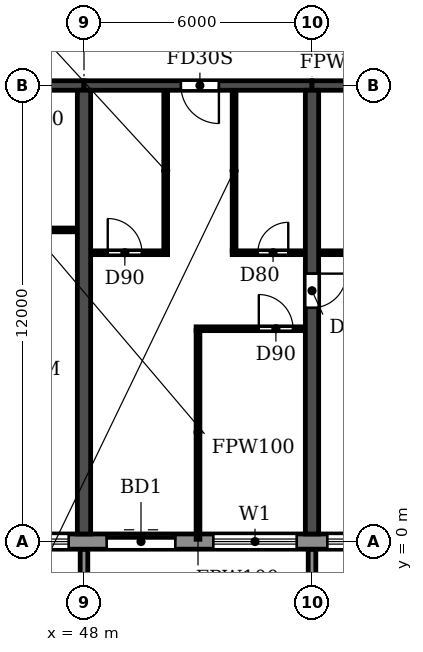
"""IFC4 building model, lengths in metres.
Left out: names, types, materials, properties, quantities, classifications, styles, units other than length and angle.
Written with IfcOpenShell. Run it as: python <this file> out.ifc"""

import sys

from ifc_helpers import new_model, si_unit, direction, frame, frame_2d, origin, place, context, subcontext, project, spatial, polyline, rectangle, outline, extrude, source, transform, mapped, element, fill, save


model = new_model("IFC4")
c1 = context("Model", 3, precision=1e-05, world=origin(), true_north=direction((0.0, 1.0)))
c2 = subcontext(c1, "Body", "Model", "MODEL_VIEW")
j1 = project(units=[si_unit("LENGTHUNIT", "METRE"), si_unit("PLANEANGLEUNIT", "RADIAN")], contexts=[c1])
p1 = place(None, origin())
s1 = spatial("IfcSite", under=j1, at=p1, CompositionType="ELEMENT")
p2 = place(p1, origin())
s2 = spatial("IfcBuilding", under=s1, at=p2, CompositionType="ELEMENT")
p3 = place(p2, frame((0.0, 0.0, 72.9)))
s3 = spatial("IfcBuildingStorey", under=s2, at=p3, CompositionType="ELEMENT", Elevation=72.9)
p4 = place(p3, frame((48.0, 0.2, 0.0), z_axis=(0.0, 0.0, 1.0), x_axis=(0.0, 1.0, 0.0)))
e1 = element("IfcWall", 1, at=p4, inside=s3, PredefinedType="SHEAR", context=c2, shape_type="SweptSolid", body=[
    extrude(rectangle(XDim=11.675, YDim=0.35, at=frame_2d((5.837, 0.0))), origin(), (0.0, 0.0, 1.0), 3.06),
])
p5 = place(p3, frame((54.0, 0.2, 0.0), z_axis=(0.0, 0.0, 1.0), x_axis=(0.0, 1.0, 0.0)))
e2 = element("IfcWall", 2, at=p5, inside=s3, PredefinedType="SHEAR", context=c2, shape_type="SweptSolid", body=[
    extrude(rectangle(XDim=11.675, YDim=0.35, at=frame_2d((5.837, 0.0))), origin(), (0.0, 0.0, 1.0), 3.06),
])
p6 = place(p5, frame((5.95, 0.0, 0.0)))
e3 = element("IfcOpeningElement", 3, at=p6, cuts=e2, PredefinedType="OPENING", context=c2, shape_type="SweptSolid", body=[
    extrude(rectangle(XDim=0.9, YDim=2.1, at=frame_2d((0.45, 1.05))), frame((0.0, 0.185, 0.0), z_axis=(0.0, -1.0, 0.0), x_axis=(1.0, 0.0, 0.0)), (0.0, 0.0, 1.0), 0.37),
])
p7 = place(p3, frame((42.0, 12.0, 0.0), z_axis=(0.0, 0.0, 1.0), x_axis=(1.0, 0.0, 0.0)))
e4 = element("IfcWall", 4, at=p7, inside=s3, PredefinedType="SHEAR", context=c2, shape_type="SweptSolid", body=[
    extrude(rectangle(XDim=6.0, YDim=0.25, at=frame_2d((3.0, 0.0))), origin(), (0.0, 0.0, 1.0), 2.46),
])
p8 = place(p7, frame((2.55, 0.0, 0.0)))
e5 = element("IfcOpeningElement", 5, at=p8, cuts=e4, PredefinedType="OPENING", context=c2, shape_type="SweptSolid", body=[
    extrude(rectangle(XDim=1.0, YDim=2.1, at=frame_2d((0.5, 1.05))), frame((0.0, 0.135, 0.0), z_axis=(0.0, -1.0, 0.0), x_axis=(1.0, 0.0, 0.0)), (0.0, 0.0, 1.0), 0.27),
])
p9 = place(p3, frame((48.0, 12.0, 0.0), z_axis=(0.0, 0.0, 1.0), x_axis=(1.0, 0.0, 0.0)))
e6 = element("IfcWall", 6, at=p9, inside=s3, PredefinedType="SHEAR", context=c2, shape_type="SweptSolid", body=[
    extrude(rectangle(XDim=6.0, YDim=0.25, at=frame_2d((3.0, 0.0))), origin(), (0.0, 0.0, 1.0), 2.46),
])
p10 = place(p9, frame((2.55, 0.0, 0.0)))
e7 = element("IfcOpeningElement", 7, at=p10, cuts=e6, PredefinedType="OPENING", context=c2, shape_type="SweptSolid", body=[
    extrude(rectangle(XDim=1.0, YDim=2.1, at=frame_2d((0.5, 1.05))), frame((0.0, 0.135, 0.0), z_axis=(0.0, -1.0, 0.0), x_axis=(1.0, 0.0, 0.0)), (0.0, 0.0, 1.0), 0.27),
])
p11 = place(p3, frame((54.0, 12.0, 0.0), z_axis=(0.0, 0.0, 1.0), x_axis=(1.0, 0.0, 0.0)))
e8 = element("IfcWall", 8, at=p11, inside=s3, PredefinedType="SHEAR", context=c2, shape_type="SweptSolid", body=[
    extrude(rectangle(XDim=6.0, YDim=0.25, at=frame_2d((3.0, 0.0))), origin(), (0.0, 0.0, 1.0), 2.46),
])
p12 = place(p3, frame((10.683, 0.0, 0.0), z_axis=(0.0, 0.0, 1.0), x_axis=(1.0, 0.0, 0.0)))
e9 = element("IfcWall", 9, at=p12, inside=s3, PredefinedType="STANDARD", context=c2, shape_type="SweptSolid", body=[
    extrude(rectangle(XDim=80.634, YDim=0.4, at=frame_2d((40.317, 0.0))), origin(), (0.0, 0.0, 1.0), 3.06),
])
p13 = place(p12, frame((1.717, 0.0, 0.9)))
e10 = element("IfcOpeningElement", 10, at=p13, cuts=e9, PredefinedType="OPENING", context=c2, shape_type="SweptSolid", body=[
    extrude(rectangle(XDim=2.2, YDim=1.5, at=frame_2d((1.1, 0.75))), frame((0.0, 0.21, 0.0), z_axis=(0.0, -1.0, 0.0), x_axis=(1.0, 0.0, 0.0)), (0.0, 0.0, 1.0), 0.42),
])
p14 = place(p12, frame((4.917, 0.0, 0.0)))
e11 = element("IfcOpeningElement", 11, at=p14, cuts=e9, PredefinedType="OPENING", context=c2, shape_type="SweptSolid", body=[
    extrude(rectangle(XDim=1.8, YDim=2.4, at=frame_2d((0.9, 1.2))), frame((0.0, 0.21, 0.0), z_axis=(0.0, -1.0, 0.0), x_axis=(1.0, 0.0, 0.0)), (0.0, 0.0, 1.0), 0.42),
])
p15 = place(p12, frame((7.717, 0.0, 0.9)))
e12 = element("IfcOpeningElement", 12, at=p15, cuts=e9, PredefinedType="OPENING", context=c2, shape_type="SweptSolid", body=[
    extrude(rectangle(XDim=2.2, YDim=1.5, at=frame_2d((1.1, 0.75))), frame((0.0, 0.21, 0.0), z_axis=(0.0, -1.0, 0.0), x_axis=(1.0, 0.0, 0.0)), (0.0, 0.0, 1.0), 0.42),
])
p16 = place(p12, frame((10.717, 0.0, 0.9)))
e13 = element("IfcOpeningElement", 13, at=p16, cuts=e9, PredefinedType="OPENING", context=c2, shape_type="SweptSolid", body=[
    extrude(rectangle(XDim=2.2, YDim=1.5, at=frame_2d((1.1, 0.75))), frame((0.0, 0.21, 0.0), z_axis=(0.0, -1.0, 0.0), x_axis=(1.0, 0.0, 0.0)), (0.0, 0.0, 1.0), 0.42),
])
p17 = place(p12, frame((13.717, 0.0, 0.9)))
e14 = element("IfcOpeningElement", 14, at=p17, cuts=e9, PredefinedType="OPENING", context=c2, shape_type="SweptSolid", body=[
    extrude(rectangle(XDim=2.2, YDim=1.5, at=frame_2d((1.1, 0.75))), frame((0.0, 0.21, 0.0), z_axis=(0.0, -1.0, 0.0), x_axis=(1.0, 0.0, 0.0)), (0.0, 0.0, 1.0), 0.42),
])
p18 = place(p12, frame((16.917, 0.0, 0.0)))
e15 = element("IfcOpeningElement", 15, at=p18, cuts=e9, PredefinedType="OPENING", context=c2, shape_type="SweptSolid", body=[
    extrude(rectangle(XDim=1.8, YDim=2.4, at=frame_2d((0.9, 1.2))), frame((0.0, 0.21, 0.0), z_axis=(0.0, -1.0, 0.0), x_axis=(1.0, 0.0, 0.0)), (0.0, 0.0, 1.0), 0.42),
])
p19 = place(p12, frame((19.717, 0.0, 0.9)))
e16 = element("IfcOpeningElement", 16, at=p19, cuts=e9, PredefinedType="OPENING", context=c2, shape_type="SweptSolid", body=[
    extrude(rectangle(XDim=2.2, YDim=1.5, at=frame_2d((1.1, 0.75))), frame((0.0, 0.21, 0.0), z_axis=(0.0, -1.0, 0.0), x_axis=(1.0, 0.0, 0.0)), (0.0, 0.0, 1.0), 0.42),
])
p20 = place(p12, frame((22.717, 0.0, 0.9)))
e17 = element("IfcOpeningElement", 17, at=p20, cuts=e9, PredefinedType="OPENING", context=c2, shape_type="SweptSolid", body=[
    extrude(rectangle(XDim=2.2, YDim=1.5, at=frame_2d((1.1, 0.75))), frame((0.0, 0.21, 0.0), z_axis=(0.0, -1.0, 0.0), x_axis=(1.0, 0.0, 0.0)), (0.0, 0.0, 1.0), 0.42),
])
p21 = place(p12, frame((25.917, 0.0, 0.0)))
e18 = element("IfcOpeningElement", 18, at=p21, cuts=e9, PredefinedType="OPENING", context=c2, shape_type="SweptSolid", body=[
    extrude(rectangle(XDim=1.8, YDim=2.4, at=frame_2d((0.9, 1.2))), frame((0.0, 0.21, 0.0), z_axis=(0.0, -1.0, 0.0), x_axis=(1.0, 0.0, 0.0)), (0.0, 0.0, 1.0), 0.42),
])
p22 = place(p12, frame((28.717, 0.0, 0.9)))
e19 = element("IfcOpeningElement", 19, at=p22, cuts=e9, PredefinedType="OPENING", context=c2, shape_type="SweptSolid", body=[
    extrude(rectangle(XDim=2.2, YDim=1.5, at=frame_2d((1.1, 0.75))), frame((0.0, 0.21, 0.0), z_axis=(0.0, -1.0, 0.0), x_axis=(1.0, 0.0, 0.0)), (0.0, 0.0, 1.0), 0.42),
])
p23 = place(p12, frame((31.717, 0.0, 0.9)))
e20 = element("IfcOpeningElement", 20, at=p23, cuts=e9, PredefinedType="OPENING", context=c2, shape_type="SweptSolid", body=[
    extrude(rectangle(XDim=2.2, YDim=1.5, at=frame_2d((1.1, 0.75))), frame((0.0, 0.21, 0.0), z_axis=(0.0, -1.0, 0.0), x_axis=(1.0, 0.0, 0.0)), (0.0, 0.0, 1.0), 0.42),
])
p24 = place(p12, frame((34.717, 0.0, 0.9)))
e21 = element("IfcOpeningElement", 21, at=p24, cuts=e9, PredefinedType="OPENING", context=c2, shape_type="SweptSolid", body=[
    extrude(rectangle(XDim=2.2, YDim=1.5, at=frame_2d((1.1, 0.75))), frame((0.0, 0.21, 0.0), z_axis=(0.0, -1.0, 0.0), x_axis=(1.0, 0.0, 0.0)), (0.0, 0.0, 1.0), 0.42),
])
p25 = place(p12, frame((37.917, 0.0, 0.0)))
e22 = element("IfcOpeningElement", 22, at=p25, cuts=e9, PredefinedType="OPENING", context=c2, shape_type="SweptSolid", body=[
    extrude(rectangle(XDim=1.8, YDim=2.4, at=frame_2d((0.9, 1.2))), frame((0.0, 0.21, 0.0), z_axis=(0.0, -1.0, 0.0), x_axis=(1.0, 0.0, 0.0)), (0.0, 0.0, 1.0), 0.42),
])
p26 = place(p12, frame((40.717, 0.0, 0.9)))
e23 = element("IfcOpeningElement", 23, at=p26, cuts=e9, PredefinedType="OPENING", context=c2, shape_type="SweptSolid", body=[
    extrude(rectangle(XDim=2.2, YDim=1.5, at=frame_2d((1.1, 0.75))), frame((0.0, 0.21, 0.0), z_axis=(0.0, -1.0, 0.0), x_axis=(1.0, 0.0, 0.0)), (0.0, 0.0, 1.0), 0.42),
])
p27 = place(p12, frame((43.717, 0.0, 0.9)))
e24 = element("IfcOpeningElement", 24, at=p27, cuts=e9, PredefinedType="OPENING", context=c2, shape_type="SweptSolid", body=[
    extrude(rectangle(XDim=2.2, YDim=1.5, at=frame_2d((1.1, 0.75))), frame((0.0, 0.21, 0.0), z_axis=(0.0, -1.0, 0.0), x_axis=(1.0, 0.0, 0.0)), (0.0, 0.0, 1.0), 0.42),
])
p28 = place(p12, frame((46.717, 0.0, 0.9)))
e25 = element("IfcOpeningElement", 25, at=p28, cuts=e9, PredefinedType="OPENING", context=c2, shape_type="SweptSolid", body=[
    extrude(rectangle(XDim=2.2, YDim=1.5, at=frame_2d((1.1, 0.75))), frame((0.0, 0.21, 0.0), z_axis=(0.0, -1.0, 0.0), x_axis=(1.0, 0.0, 0.0)), (0.0, 0.0, 1.0), 0.42),
])
p29 = place(p12, frame((49.917, 0.0, 0.0)))
e26 = element("IfcOpeningElement", 26, at=p29, cuts=e9, PredefinedType="OPENING", context=c2, shape_type="SweptSolid", body=[
    extrude(rectangle(XDim=1.8, YDim=2.4, at=frame_2d((0.9, 1.2))), frame((0.0, 0.21, 0.0), z_axis=(0.0, -1.0, 0.0), x_axis=(1.0, 0.0, 0.0)), (0.0, 0.0, 1.0), 0.42),
])
p30 = place(p12, frame((52.717, 0.0, 0.9)))
e27 = element("IfcOpeningElement", 27, at=p30, cuts=e9, PredefinedType="OPENING", context=c2, shape_type="SweptSolid", body=[
    extrude(rectangle(XDim=2.2, YDim=1.5, at=frame_2d((1.1, 0.75))), frame((0.0, 0.21, 0.0), z_axis=(0.0, -1.0, 0.0), x_axis=(1.0, 0.0, 0.0)), (0.0, 0.0, 1.0), 0.42),
])
p31 = place(p12, frame((55.717, 0.0, 0.9)))
e28 = element("IfcOpeningElement", 28, at=p31, cuts=e9, PredefinedType="OPENING", context=c2, shape_type="SweptSolid", body=[
    extrude(rectangle(XDim=2.2, YDim=1.5, at=frame_2d((1.1, 0.75))), frame((0.0, 0.21, 0.0), z_axis=(0.0, -1.0, 0.0), x_axis=(1.0, 0.0, 0.0)), (0.0, 0.0, 1.0), 0.42),
])
p32 = place(p12, frame((58.717, 0.0, 0.9)))
e29 = element("IfcOpeningElement", 29, at=p32, cuts=e9, PredefinedType="OPENING", context=c2, shape_type="SweptSolid", body=[
    extrude(rectangle(XDim=2.2, YDim=1.5, at=frame_2d((1.1, 0.75))), frame((0.0, 0.21, 0.0), z_axis=(0.0, -1.0, 0.0), x_axis=(1.0, 0.0, 0.0)), (0.0, 0.0, 1.0), 0.42),
])
p33 = place(p12, frame((61.717, 0.0, 0.9)))
e30 = element("IfcOpeningElement", 30, at=p33, cuts=e9, PredefinedType="OPENING", context=c2, shape_type="SweptSolid", body=[
    extrude(rectangle(XDim=2.2, YDim=1.5, at=frame_2d((1.1, 0.75))), frame((0.0, 0.21, 0.0), z_axis=(0.0, -1.0, 0.0), x_axis=(1.0, 0.0, 0.0)), (0.0, 0.0, 1.0), 0.42),
])
p34 = place(p12, frame((64.917, 0.0, 0.0)))
e31 = element("IfcOpeningElement", 31, at=p34, cuts=e9, PredefinedType="OPENING", context=c2, shape_type="SweptSolid", body=[
    extrude(rectangle(XDim=1.8, YDim=2.4, at=frame_2d((0.9, 1.2))), frame((0.0, 0.21, 0.0), z_axis=(0.0, -1.0, 0.0), x_axis=(1.0, 0.0, 0.0)), (0.0, 0.0, 1.0), 0.42),
])
p35 = place(p12, frame((67.717, 0.0, 0.9)))
e32 = element("IfcOpeningElement", 32, at=p35, cuts=e9, PredefinedType="OPENING", context=c2, shape_type="SweptSolid", body=[
    extrude(rectangle(XDim=2.2, YDim=1.5, at=frame_2d((1.1, 0.75))), frame((0.0, 0.21, 0.0), z_axis=(0.0, -1.0, 0.0), x_axis=(1.0, 0.0, 0.0)), (0.0, 0.0, 1.0), 0.42),
])
p36 = place(p12, frame((70.717, 0.0, 0.9)))
e33 = element("IfcOpeningElement", 33, at=p36, cuts=e9, PredefinedType="OPENING", context=c2, shape_type="SweptSolid", body=[
    extrude(rectangle(XDim=2.2, YDim=1.5, at=frame_2d((1.1, 0.75))), frame((0.0, 0.21, 0.0), z_axis=(0.0, -1.0, 0.0), x_axis=(1.0, 0.0, 0.0)), (0.0, 0.0, 1.0), 0.42),
])
p37 = place(p12, frame((73.917, 0.0, 0.0)))
e34 = element("IfcOpeningElement", 34, at=p37, cuts=e9, PredefinedType="OPENING", context=c2, shape_type="SweptSolid", body=[
    extrude(rectangle(XDim=1.8, YDim=2.4, at=frame_2d((0.9, 1.2))), frame((0.0, 0.21, 0.0), z_axis=(0.0, -1.0, 0.0), x_axis=(1.0, 0.0, 0.0)), (0.0, 0.0, 1.0), 0.42),
])
p38 = place(p12, frame((76.717, 0.0, 0.9)))
e35 = element("IfcOpeningElement", 35, at=p38, cuts=e9, PredefinedType="OPENING", context=c2, shape_type="SweptSolid", body=[
    extrude(rectangle(XDim=2.2, YDim=1.5, at=frame_2d((1.1, 0.75))), frame((0.0, 0.21, 0.0), z_axis=(0.0, -1.0, 0.0), x_axis=(1.0, 0.0, 0.0)), (0.0, 0.0, 1.0), 0.42),
])
m1 = source(origin(), c2, "Body", "SweptSolid", [
    extrude(outline(polyline([(0.0, 0.0), (0.2, 0.0), (0.2, 1.65), (0.0, 1.65), (0.0, 0.0)])), origin(), (0.0, 0.0, 1.0), 3.1),
])
for number, where in (
    (36, (47.9, -1.85, 0.0)),
    (37, (53.9, -1.85, 0.0)),
):
    element("IfcWall", number, at=place(p3, frame(where)), inside=s3, PredefinedType="STANDARD", context=c2, shape_type="MappedRepresentation", body=[
        mapped(m1, transform((0.0, 0.0, 0.0))),
    ])
p39 = place(p3, frame((50.95, 5.6, 0.0), z_axis=(0.0, 0.0, 1.0), x_axis=(1.0, 0.0, 0.0)))
e38 = element("IfcWall", 38, at=p39, inside=s3, PredefinedType="PARTITIONING", context=c2, shape_type="SweptSolid", body=[
    extrude(rectangle(XDim=2.865, YDim=0.1, at=frame_2d((1.433, 0.0))), origin(), (0.0, 0.0, 1.0), 3.06),
])
p40 = place(p39, frame((1.65, 0.0, 0.0)))
e39 = element("IfcOpeningElement", 39, at=p40, cuts=e38, PredefinedType="OPENING", context=c2, shape_type="SweptSolid", body=[
    extrude(rectangle(XDim=0.9, YDim=2.1, at=frame_2d((0.45, 1.05))), frame((0.0, 0.06, 0.0), z_axis=(0.0, -1.0, 0.0), x_axis=(1.0, 0.0, 0.0)), (0.0, 0.0, 1.0), 0.12),
])
p41 = place(p3, frame((48.185, 7.6, 0.0), z_axis=(0.0, 0.0, 1.0), x_axis=(1.0, 0.0, 0.0)))
e40 = element("IfcWall", 40, at=p41, inside=s3, PredefinedType="PARTITIONING", context=c2, shape_type="SweptSolid", body=[
    extrude(rectangle(XDim=2.015, YDim=0.1, at=frame_2d((1.007, 0.0))), origin(), (0.0, 0.0, 1.0), 3.06),
])
p42 = place(p41, frame((0.44, 0.0, 0.0)))
e41 = element("IfcOpeningElement", 41, at=p42, cuts=e40, PredefinedType="OPENING", context=c2, shape_type="SweptSolid", body=[
    extrude(rectangle(XDim=0.9, YDim=2.1, at=frame_2d((0.45, 1.05))), frame((0.0, 0.06, 0.0), z_axis=(0.0, -1.0, 0.0), x_axis=(1.0, 0.0, 0.0)), (0.0, 0.0, 1.0), 0.12),
])
p43 = place(p3, frame((51.9, 7.6, 0.0), z_axis=(0.0, 0.0, 1.0), x_axis=(1.0, 0.0, 0.0)))
e42 = element("IfcWall", 42, at=p43, inside=s3, PredefinedType="PARTITIONING", context=c2, shape_type="SweptSolid", body=[
    extrude(rectangle(XDim=1.915, YDim=0.1, at=frame_2d((0.958, 0.0))), origin(), (0.0, 0.0, 1.0), 3.06),
])
p44 = place(p43, frame((0.675, 0.0, 0.0)))
e43 = element("IfcOpeningElement", 43, at=p44, cuts=e42, PredefinedType="OPENING", context=c2, shape_type="SweptSolid", body=[
    extrude(rectangle(XDim=0.8, YDim=2.1, at=frame_2d((0.4, 1.05))), frame((0.0, 0.06, 0.0), z_axis=(0.0, -1.0, 0.0), x_axis=(1.0, 0.0, 0.0)), (0.0, 0.0, 1.0), 0.12),
])
p45 = place(p3, frame((54.185, 7.6, 0.0), z_axis=(0.0, 0.0, 1.0), x_axis=(1.0, 0.0, 0.0)))
e44 = element("IfcWall", 44, at=p45, inside=s3, PredefinedType="PARTITIONING", context=c2, shape_type="SweptSolid", body=[
    extrude(rectangle(XDim=2.715, YDim=0.1, at=frame_2d((1.357, 0.0))), origin(), (0.0, 0.0, 1.0), 3.06),
])
p46 = place(p45, frame((0.915, 0.0, 0.0)))
e45 = element("IfcOpeningElement", 45, at=p46, cuts=e44, PredefinedType="OPENING", context=c2, shape_type="SweptSolid", body=[
    extrude(rectangle(XDim=0.8, YDim=2.1, at=frame_2d((0.4, 1.05))), frame((0.0, 0.06, 0.0), z_axis=(0.0, -1.0, 0.0), x_axis=(1.0, 0.0, 0.0)), (0.0, 0.0, 1.0), 0.12),
])
p47 = place(p3, frame((45.9, 8.2, 0.0), z_axis=(0.0, 0.0, 1.0), x_axis=(1.0, 0.0, 0.0)))
e46 = element("IfcWall", 46, at=p47, inside=s3, PredefinedType="PARTITIONING", context=c2, shape_type="SweptSolid", body=[
    extrude(rectangle(XDim=1.915, YDim=0.1, at=frame_2d((0.958, 0.0))), origin(), (0.0, 0.0, 1.0), 3.06),
])
p48 = place(p3, frame((50.15, 7.65, 0.0), z_axis=(0.0, 0.0, 1.0), x_axis=(0.0, 1.0, 0.0)))
e47 = element("IfcWall", 47, at=p48, inside=s3, PredefinedType="PARTITIONING", context=c2, shape_type="SweptSolid", body=[
    extrude(rectangle(XDim=4.215, YDim=0.1, at=frame_2d((2.107, 0.0))), origin(), (0.0, 0.0, 1.0), 3.06),
])
p49 = place(p3, frame((51.0, 0.06, 0.0), z_axis=(0.0, 0.0, 1.0), x_axis=(0.0, 1.0, 0.0)))
e48 = element("IfcWall", 48, at=p49, inside=s3, PredefinedType="PARTITIONING", context=c2, shape_type="SweptSolid", body=[
    extrude(rectangle(XDim=5.49, YDim=0.1, at=frame_2d((2.745, 0.0))), origin(), (0.0, 0.0, 1.0), 3.06),
])
p50 = place(p3, frame((51.95, 7.65, 0.0), z_axis=(0.0, 0.0, 1.0), x_axis=(0.0, 1.0, 0.0)))
e49 = element("IfcWall", 49, at=p50, inside=s3, PredefinedType="PARTITIONING", context=c2, shape_type="SweptSolid", body=[
    extrude(rectangle(XDim=4.215, YDim=0.1, at=frame_2d((2.107, 0.0))), origin(), (0.0, 0.0, 1.0), 3.06),
])
p51 = place(p24, origin())
e50 = element("IfcWindow", 50, at=p51, inside=s3, PartitioningType="DOUBLE_PANEL_HORIZONTAL", PredefinedType="WINDOW", context=c2, shape_type="SweptSolid", body=[
    extrude(rectangle(XDim=2.2, YDim=1.5, at=frame_2d((1.1, 0.75))), frame((0.0, 0.03, 0.0), z_axis=(0.0, -1.0, 0.0), x_axis=(1.0, 0.0, 0.0)), (0.0, 0.0, 1.0), 0.06),
])
fill(e21, e50)
p52 = place(p25, origin())
e51 = element("IfcDoor", 51, at=p52, inside=s3, OperationType="DOUBLE_DOOR_SLIDING", PredefinedType="DOOR", context=c2, shape_type="SweptSolid", body=[
    extrude(rectangle(XDim=1.8, YDim=2.4, at=frame_2d((0.9, 1.2))), frame((0.0, 0.025, 0.0), z_axis=(0.0, -1.0, 0.0), x_axis=(1.0, 0.0, 0.0)), (0.0, 0.0, 1.0), 0.05),
])
fill(e22, e51)
p53 = place(p26, origin())
e52 = element("IfcWindow", 52, at=p53, inside=s3, PartitioningType="DOUBLE_PANEL_HORIZONTAL", PredefinedType="WINDOW", context=c2, shape_type="SweptSolid", body=[
    extrude(rectangle(XDim=2.2, YDim=1.5, at=frame_2d((1.1, 0.75))), frame((0.0, 0.03, 0.0), z_axis=(0.0, -1.0, 0.0), x_axis=(1.0, 0.0, 0.0)), (0.0, 0.0, 1.0), 0.06),
])
fill(e23, e52)
p54 = place(p27, origin())
e53 = element("IfcWindow", 53, at=p54, inside=s3, PartitioningType="DOUBLE_PANEL_HORIZONTAL", PredefinedType="WINDOW", context=c2, shape_type="SweptSolid", body=[
    extrude(rectangle(XDim=2.2, YDim=1.5, at=frame_2d((1.1, 0.75))), frame((0.0, 0.03, 0.0), z_axis=(0.0, -1.0, 0.0), x_axis=(1.0, 0.0, 0.0)), (0.0, 0.0, 1.0), 0.06),
])
fill(e24, e53)
p55 = place(p42, origin())
e54 = element("IfcDoor", 54, at=p55, inside=s3, OperationType="SINGLE_SWING_LEFT", PredefinedType="DOOR", context=c2, shape_type="SweptSolid", body=[
    extrude(rectangle(XDim=0.9, YDim=2.1, at=frame_2d((0.45, 1.05))), frame((0.0, 0.025, 0.0), z_axis=(0.0, -1.0, 0.0), x_axis=(1.0, 0.0, 0.0)), (0.0, 0.0, 1.0), 0.05),
])
fill(e41, e54)
p56 = place(p10, frame((1.0, 0.0, 0.0), z_axis=(0.0, 0.0, 1.0), x_axis=(-1.0, 0.0, 0.0)))
e55 = element("IfcDoor", 55, at=p56, inside=s3, OperationType="SINGLE_SWING_LEFT", PredefinedType="DOOR", context=c2, shape_type="SweptSolid", body=[
    extrude(rectangle(XDim=1.0, YDim=2.1, at=frame_2d((0.5, 1.05))), frame((0.0, 0.025, 0.0), z_axis=(0.0, -1.0, 0.0), x_axis=(1.0, 0.0, 0.0)), (0.0, 0.0, 1.0), 0.05),
])
fill(e7, e55)
p57 = place(p44, origin())
e56 = element("IfcDoor", 56, at=p57, inside=s3, OperationType="SINGLE_SWING_RIGHT", PredefinedType="DOOR", context=c2, shape_type="SweptSolid", body=[
    extrude(rectangle(XDim=0.8, YDim=2.1, at=frame_2d((0.4, 1.05))), frame((0.0, 0.025, 0.0), z_axis=(0.0, -1.0, 0.0), x_axis=(1.0, 0.0, 0.0)), (0.0, 0.0, 1.0), 0.05),
])
fill(e43, e56)
p58 = place(p40, origin())
e57 = element("IfcDoor", 57, at=p58, inside=s3, OperationType="SINGLE_SWING_LEFT", PredefinedType="DOOR", context=c2, shape_type="SweptSolid", body=[
    extrude(rectangle(XDim=0.9, YDim=2.1, at=frame_2d((0.45, 1.05))), frame((0.0, 0.025, 0.0), z_axis=(0.0, -1.0, 0.0), x_axis=(1.0, 0.0, 0.0)), (0.0, 0.0, 1.0), 0.05),
])
fill(e39, e57)
p59 = place(p6, frame((0.9, 0.0, 0.0), z_axis=(0.0, 0.0, 1.0), x_axis=(-1.0, 0.0, 0.0)))
e58 = element("IfcDoor", 58, at=p59, inside=s3, OperationType="SINGLE_SWING_LEFT", PredefinedType="DOOR", context=c2, shape_type="SweptSolid", body=[
    extrude(rectangle(XDim=0.9, YDim=2.1, at=frame_2d((0.45, 1.05))), frame((0.0, 0.025, 0.0), z_axis=(0.0, -1.0, 0.0), x_axis=(1.0, 0.0, 0.0)), (0.0, 0.0, 1.0), 0.05),
])
fill(e3, e58)
save(model, sys.argv[1])
